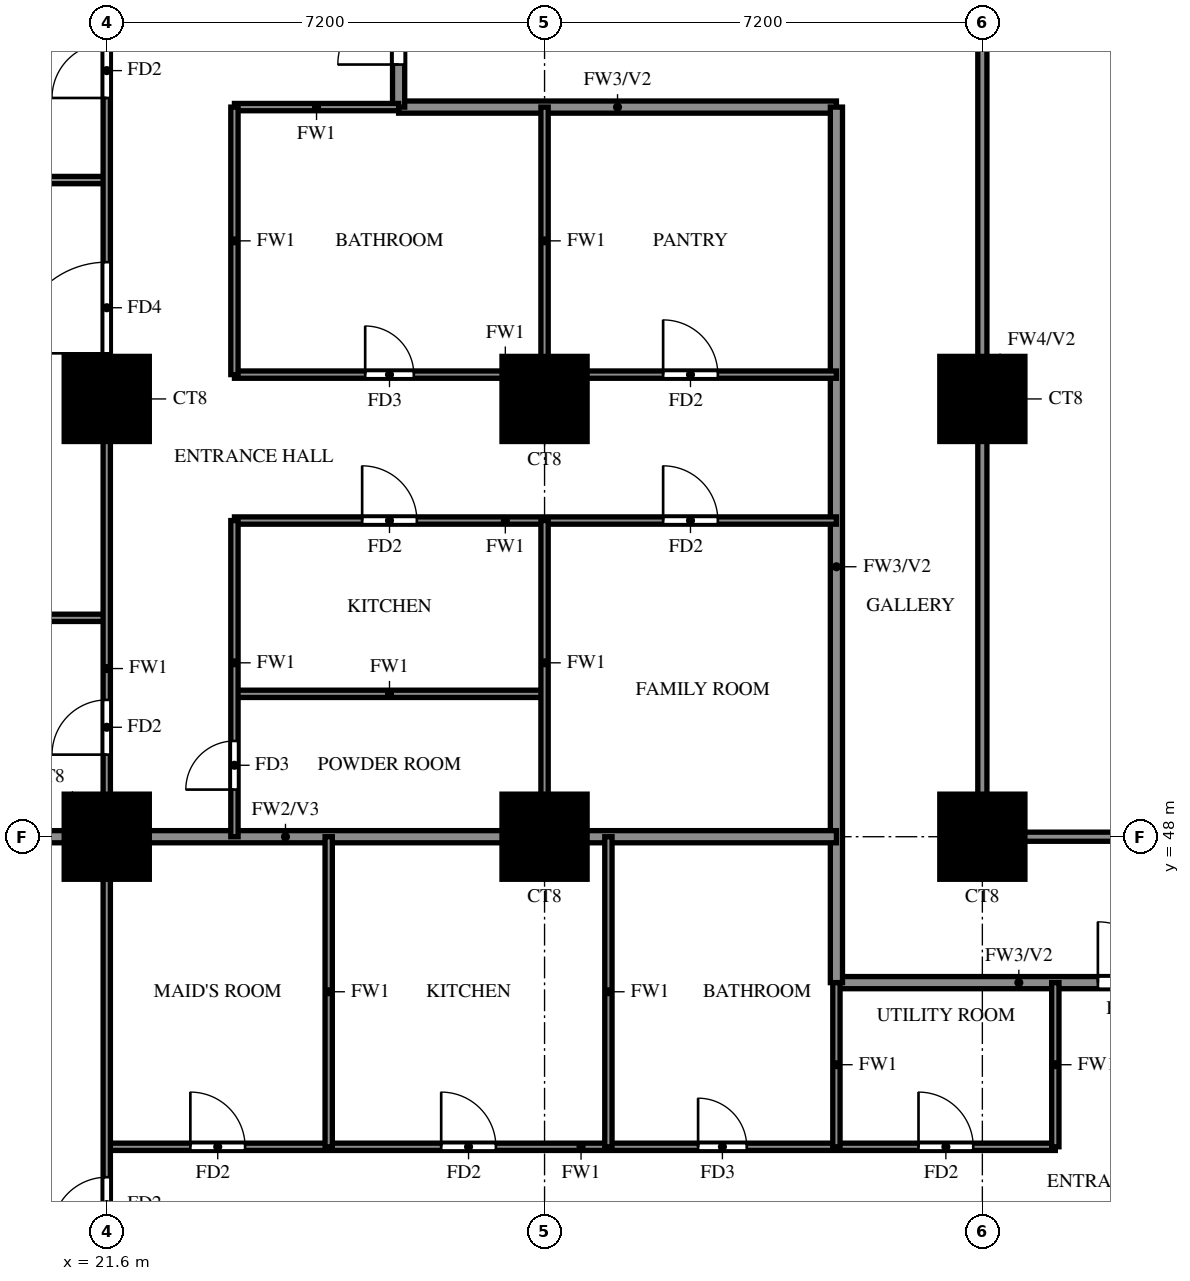
"""IFC4 building model, lengths in metres.
Left out: names, types, materials, properties, quantities, classifications, styles, units other than length and angle.
Written with IfcOpenShell. Run it as: python <this file> out.ifc"""

import sys

from ifc_helpers import new_model, si_unit, direction, frame, frame_2d, origin, origin_2d, place, context, subcontext, project, spatial, rectangle, extrude, source, transform, mapped, element, fill, save


model = new_model("IFC4")
c1 = context("Model", 3, precision=1e-05, world=origin(), true_north=direction((0.0, 1.0)))
c2 = subcontext(c1, "Body", "Model", "MODEL_VIEW")
j1 = project(units=[si_unit("LENGTHUNIT", "METRE"), si_unit("PLANEANGLEUNIT", "RADIAN")], contexts=[c1])
p1 = place(None, origin())
s1 = spatial("IfcSite", under=j1, at=p1, CompositionType="ELEMENT")
p2 = place(p1, origin())
s2 = spatial("IfcBuilding", under=s1, at=p2, CompositionType="ELEMENT")
p3 = place(p2, frame((0.0, 0.0, 37.5)))
s3 = spatial("IfcBuildingStorey", under=s2, at=p3, CompositionType="ELEMENT", Elevation=37.5)
m1 = source(origin(), c2, "Body", "SweptSolid", [
    extrude(rectangle(XDim=1.4, YDim=1.4, at=origin_2d()), origin(), (0.0, 0.0, 1.0), 3.18),
])
for number, where, z_axis, x_axis in (
    (1, (21.6, 48.0, 0.0), (0.0, 0.0, 1.0), (1.0, 0.0, 0.0)),
    (2, (28.8, 48.0, 0.0), (0.0, 0.0, 1.0), (1.0, 0.0, 0.0)),
    (3, (36.0, 48.0, 0.0), (0.0, 0.0, 1.0), (1.0, 0.0, 0.0)),
    (4, (21.6, 55.2, 0.0), (0.0, 0.0, 1.0), (1.0, 0.0, 0.0)),
    (5, (28.8, 55.2, 0.0), (0.0, 0.0, 1.0), (1.0, 0.0, 0.0)),
    (6, (36.0, 55.2, 0.0), (0.0, 0.0, 1.0), (1.0, 0.0, 0.0)),
):
    element("IfcColumn", number, at=place(p3, frame(where, z_axis=z_axis, x_axis=x_axis)), inside=s3, PredefinedType="COLUMN", context=c2, shape_type="MappedRepresentation", body=[
        mapped(m1, transform((0.0, 0.0, 0.0))),
    ])
p4 = place(p3, frame((33.6, 45.6, 0.0), z_axis=(0.0, 0.0, 1.0), x_axis=(1.0, 0.0, 0.0)))
e7 = element("IfcWall", 7, at=p4, inside=s3, PredefinedType="SOLIDWALL", context=c2, shape_type="SweptSolid", body=[
    extrude(rectangle(XDim=6.0, YDim=0.2, at=frame_2d((3.0, 0.0))), origin(), (0.0, 0.0, 1.0), 3.18),
])
p5 = place(p4, frame((4.3, 0.0, 0.0)))
e8 = element("IfcOpeningElement", 8, at=p5, cuts=e7, PredefinedType="OPENING", context=c2, shape_type="SweptSolid", body=[
    extrude(rectangle(XDim=1.0, YDim=2.1, at=frame_2d((0.5, 1.05))), frame((0.0, 0.11, 0.0), z_axis=(0.0, -1.0, 0.0), x_axis=(1.0, 0.0, 0.0)), (0.0, 0.0, 1.0), 0.22),
])
p6 = place(p3, frame((26.4, 60.0, 0.0), z_axis=(0.0, 0.0, 1.0), x_axis=(1.0, 0.0, 0.0)))
e9 = element("IfcWall", 9, at=p6, inside=s3, PredefinedType="SOLIDWALL", context=c2, shape_type="SweptSolid", body=[
    extrude(rectangle(XDim=7.2, YDim=0.2, at=frame_2d((3.6, 0.0))), origin(), (0.0, 0.0, 1.0), 3.18),
])
p7 = place(p3, frame((26.4, 60.0, 0.0), z_axis=(0.0, 0.0, 1.0), x_axis=(0.0, 1.0, 0.0)))
e10 = element("IfcWall", 10, at=p7, inside=s3, PredefinedType="SOLIDWALL", context=c2, shape_type="SweptSolid", body=[
    extrude(rectangle(XDim=9.6, YDim=0.2, at=frame_2d((4.8, 0.0))), origin(), (0.0, 0.0, 1.0), 3.18),
])
p8 = place(p7, frame((0.7, 0.0, 0.0)))
e11 = element("IfcOpeningElement", 11, at=p8, cuts=e10, PredefinedType="OPENING", context=c2, shape_type="SweptSolid", body=[
    extrude(rectangle(XDim=1.0, YDim=2.1, at=frame_2d((0.5, 1.05))), frame((0.0, 0.11, 0.0), z_axis=(0.0, -1.0, 0.0), x_axis=(1.0, 0.0, 0.0)), (0.0, 0.0, 1.0), 0.22),
])
p9 = place(p7, frame((3.1, 0.0, 0.0)))
e12 = element("IfcOpeningElement", 12, at=p9, cuts=e10, PredefinedType="OPENING", context=c2, shape_type="SweptSolid", body=[
    extrude(rectangle(XDim=1.0, YDim=2.1, at=frame_2d((0.5, 1.05))), frame((0.0, 0.11, 0.0), z_axis=(0.0, -1.0, 0.0), x_axis=(1.0, 0.0, 0.0)), (0.0, 0.0, 1.0), 0.22),
])
p10 = place(p3, frame((33.6, 45.6, 0.0), z_axis=(0.0, 0.0, 1.0), x_axis=(0.0, 1.0, 0.0)))
e13 = element("IfcWall", 13, at=p10, inside=s3, PredefinedType="SOLIDWALL", context=c2, shape_type="SweptSolid", body=[
    extrude(rectangle(XDim=14.4, YDim=0.2, at=frame_2d((7.2, 0.0))), origin(), (0.0, 0.0, 1.0), 3.18),
])
p11 = place(p3, frame((14.525, 48.0, 0.0), z_axis=(0.0, 0.0, 1.0), x_axis=(1.0, 0.0, 0.0)))
e14 = element("IfcWall", 14, at=p11, inside=s3, PredefinedType="SOLIDWALL", context=c2, shape_type="SweptSolid", body=[
    extrude(rectangle(XDim=19.075, YDim=0.2, at=frame_2d((9.538, 0.0))), origin(), (0.0, 0.0, 1.0), 3.18),
])
p12 = place(p3, frame((21.6, 42.9, 0.0), z_axis=(0.0, 0.0, 1.0), x_axis=(1.0, 0.0, 0.0)))
e15 = element("IfcWall", 15, at=p12, inside=s3, PredefinedType="PARTITIONING", context=c2, shape_type="SweptSolid", body=[
    extrude(rectangle(XDim=15.6, YDim=0.12, at=frame_2d((7.8, 0.0))), origin(), (0.0, 0.0, 1.0), 3.18),
])
p13 = place(p12, frame((1.375, 0.0, 0.0)))
e16 = element("IfcOpeningElement", 16, at=p13, cuts=e15, PredefinedType="OPENING", context=c2, shape_type="SweptSolid", body=[
    extrude(rectangle(XDim=0.9, YDim=2.1, at=frame_2d((0.45, 1.05))), frame((0.0, 0.07, 0.0), z_axis=(0.0, -1.0, 0.0), x_axis=(1.0, 0.0, 0.0)), (0.0, 0.0, 1.0), 0.14),
])
p14 = place(p12, frame((5.5, 0.0, 0.0)))
e17 = element("IfcOpeningElement", 17, at=p14, cuts=e15, PredefinedType="OPENING", context=c2, shape_type="SweptSolid", body=[
    extrude(rectangle(XDim=0.9, YDim=2.1, at=frame_2d((0.45, 1.05))), frame((0.0, 0.07, 0.0), z_axis=(0.0, -1.0, 0.0), x_axis=(1.0, 0.0, 0.0)), (0.0, 0.0, 1.0), 0.14),
])
p15 = place(p12, frame((9.725, 0.0, 0.0)))
e18 = element("IfcOpeningElement", 18, at=p15, cuts=e15, PredefinedType="OPENING", context=c2, shape_type="SweptSolid", body=[
    extrude(rectangle(XDim=0.8, YDim=2.1, at=frame_2d((0.4, 1.05))), frame((0.0, 0.07, 0.0), z_axis=(0.0, -1.0, 0.0), x_axis=(1.0, 0.0, 0.0)), (0.0, 0.0, 1.0), 0.14),
])
p16 = place(p12, frame((13.35, 0.0, 0.0)))
e19 = element("IfcOpeningElement", 19, at=p16, cuts=e15, PredefinedType="OPENING", context=c2, shape_type="SweptSolid", body=[
    extrude(rectangle(XDim=0.9, YDim=2.1, at=frame_2d((0.45, 1.05))), frame((0.0, 0.07, 0.0), z_axis=(0.0, -1.0, 0.0), x_axis=(1.0, 0.0, 0.0)), (0.0, 0.0, 1.0), 0.14),
])
p17 = place(p3, frame((23.7, 50.35, 0.0), z_axis=(0.0, 0.0, 1.0), x_axis=(1.0, 0.0, 0.0)))
e20 = element("IfcWall", 20, at=p17, inside=s3, PredefinedType="PARTITIONING", context=c2, shape_type="SweptSolid", body=[
    extrude(rectangle(XDim=5.1, YDim=0.12, at=frame_2d((2.55, 0.0))), origin(), (0.0, 0.0, 1.0), 3.18),
])
p18 = place(p3, frame((14.525, 51.6, 0.0), z_axis=(0.0, 0.0, 1.0), x_axis=(1.0, 0.0, 0.0)))
e21 = element("IfcWall", 21, at=p18, inside=s3, PredefinedType="PARTITIONING", context=c2, shape_type="SweptSolid", body=[
    extrude(rectangle(XDim=7.075, YDim=0.12, at=frame_2d((3.538, 0.0))), origin(), (0.0, 0.0, 1.0), 2.28),
])
p19 = place(p3, frame((23.7, 53.2, 0.0), z_axis=(0.0, 0.0, 1.0), x_axis=(1.0, 0.0, 0.0)))
e22 = element("IfcWall", 22, at=p19, inside=s3, PredefinedType="PARTITIONING", context=c2, shape_type="SweptSolid", body=[
    extrude(rectangle(XDim=9.9, YDim=0.12, at=frame_2d((4.95, 0.0))), origin(), (0.0, 0.0, 1.0), 3.18),
])
p20 = place(p19, frame((2.1, 0.0, 0.0)))
e23 = element("IfcOpeningElement", 23, at=p20, cuts=e22, PredefinedType="OPENING", context=c2, shape_type="SweptSolid", body=[
    extrude(rectangle(XDim=0.9, YDim=2.1, at=frame_2d((0.45, 1.05))), frame((0.0, 0.07, 0.0), z_axis=(0.0, -1.0, 0.0), x_axis=(1.0, 0.0, 0.0)), (0.0, 0.0, 1.0), 0.14),
])
p21 = place(p19, frame((7.05, 0.0, 0.0)))
e24 = element("IfcOpeningElement", 24, at=p21, cuts=e22, PredefinedType="OPENING", context=c2, shape_type="SweptSolid", body=[
    extrude(rectangle(XDim=0.9, YDim=2.1, at=frame_2d((0.45, 1.05))), frame((0.0, 0.07, 0.0), z_axis=(0.0, -1.0, 0.0), x_axis=(1.0, 0.0, 0.0)), (0.0, 0.0, 1.0), 0.14),
])
p22 = place(p3, frame((23.7, 55.6, 0.0), z_axis=(0.0, 0.0, 1.0), x_axis=(1.0, 0.0, 0.0)))
e25 = element("IfcWall", 25, at=p22, inside=s3, PredefinedType="PARTITIONING", context=c2, shape_type="SweptSolid", body=[
    extrude(rectangle(XDim=9.9, YDim=0.12, at=frame_2d((4.95, 0.0))), origin(), (0.0, 0.0, 1.0), 3.18),
])
p23 = place(p22, frame((2.15, 0.0, 0.0)))
e26 = element("IfcOpeningElement", 26, at=p23, cuts=e25, PredefinedType="OPENING", context=c2, shape_type="SweptSolid", body=[
    extrude(rectangle(XDim=0.8, YDim=2.1, at=frame_2d((0.4, 1.05))), frame((0.0, 0.07, 0.0), z_axis=(0.0, -1.0, 0.0), x_axis=(1.0, 0.0, 0.0)), (0.0, 0.0, 1.0), 0.14),
])
p24 = place(p22, frame((7.05, 0.0, 0.0)))
e27 = element("IfcOpeningElement", 27, at=p24, cuts=e25, PredefinedType="OPENING", context=c2, shape_type="SweptSolid", body=[
    extrude(rectangle(XDim=0.9, YDim=2.1, at=frame_2d((0.45, 1.05))), frame((0.0, 0.07, 0.0), z_axis=(0.0, -1.0, 0.0), x_axis=(1.0, 0.0, 0.0)), (0.0, 0.0, 1.0), 0.14),
])
p25 = place(p3, frame((14.525, 58.8, 0.0), z_axis=(0.0, 0.0, 1.0), x_axis=(1.0, 0.0, 0.0)))
e28 = element("IfcWall", 28, at=p25, inside=s3, PredefinedType="PARTITIONING", context=c2, shape_type="SweptSolid", body=[
    extrude(rectangle(XDim=7.075, YDim=0.12, at=frame_2d((3.538, 0.0))), origin(), (0.0, 0.0, 1.0), 2.28),
])
p26 = place(p3, frame((23.7, 60.0, 0.0), z_axis=(0.0, 0.0, 1.0), x_axis=(1.0, 0.0, 0.0)))
e29 = element("IfcWall", 29, at=p26, inside=s3, PredefinedType="PARTITIONING", context=c2, shape_type="SweptSolid", body=[
    extrude(rectangle(XDim=2.7, YDim=0.12, at=frame_2d((1.35, 0.0))), origin(), (0.0, 0.0, 1.0), 3.18),
])
p27 = place(p3, frame((21.6, 33.725, 0.0), z_axis=(0.0, 0.0, 1.0), x_axis=(0.0, 1.0, 0.0)))
e30 = element("IfcWall", 30, at=p27, inside=s3, PredefinedType="PARTITIONING", context=c2, shape_type="SweptSolid", body=[
    extrude(rectangle(XDim=35.875, YDim=0.12, at=frame_2d((17.938, 0.0))), origin(), (0.0, 0.0, 1.0), 3.18),
])
p28 = place(p27, frame((7.775, 0.0, 0.0)))
e31 = element("IfcOpeningElement", 31, at=p28, cuts=e30, PredefinedType="OPENING", context=c2, shape_type="SweptSolid", body=[
    extrude(rectangle(XDim=0.9, YDim=2.1, at=frame_2d((0.45, 1.05))), frame((0.0, 0.07, 0.0), z_axis=(0.0, -1.0, 0.0), x_axis=(1.0, 0.0, 0.0)), (0.0, 0.0, 1.0), 0.14),
])
p29 = place(p27, frame((15.625, 0.0, 0.0)))
e32 = element("IfcOpeningElement", 32, at=p29, cuts=e30, PredefinedType="OPENING", context=c2, shape_type="SweptSolid", body=[
    extrude(rectangle(XDim=0.9, YDim=2.1, at=frame_2d((0.45, 1.05))), frame((0.0, 0.07, 0.0), z_axis=(0.0, -1.0, 0.0), x_axis=(1.0, 0.0, 0.0)), (0.0, 0.0, 1.0), 0.14),
])
p30 = place(p27, frame((22.225, 0.0, 0.0)))
e33 = element("IfcOpeningElement", 33, at=p30, cuts=e30, PredefinedType="OPENING", context=c2, shape_type="SweptSolid", body=[
    extrude(rectangle(XDim=1.5, YDim=2.1, at=frame_2d((0.75, 1.05))), frame((0.0, 0.07, 0.0), z_axis=(0.0, -1.0, 0.0), x_axis=(1.0, 0.0, 0.0)), (0.0, 0.0, 1.0), 0.14),
])
p31 = place(p27, frame((26.425, 0.0, 0.0)))
e34 = element("IfcOpeningElement", 34, at=p31, cuts=e30, PredefinedType="OPENING", context=c2, shape_type="SweptSolid", body=[
    extrude(rectangle(XDim=0.9, YDim=2.1, at=frame_2d((0.45, 1.05))), frame((0.0, 0.07, 0.0), z_axis=(0.0, -1.0, 0.0), x_axis=(1.0, 0.0, 0.0)), (0.0, 0.0, 1.0), 0.14),
])
p32 = place(p27, frame((30.025, 0.0, 0.0)))
e35 = element("IfcOpeningElement", 35, at=p32, cuts=e30, PredefinedType="OPENING", context=c2, shape_type="SweptSolid", body=[
    extrude(rectangle(XDim=0.9, YDim=2.1, at=frame_2d((0.45, 1.05))), frame((0.0, 0.07, 0.0), z_axis=(0.0, -1.0, 0.0), x_axis=(1.0, 0.0, 0.0)), (0.0, 0.0, 1.0), 0.14),
])
p33 = place(p27, frame((33.625, 0.0, 0.0)))
e36 = element("IfcOpeningElement", 36, at=p33, cuts=e30, PredefinedType="OPENING", context=c2, shape_type="SweptSolid", body=[
    extrude(rectangle(XDim=0.9, YDim=2.1, at=frame_2d((0.45, 1.05))), frame((0.0, 0.07, 0.0), z_axis=(0.0, -1.0, 0.0), x_axis=(1.0, 0.0, 0.0)), (0.0, 0.0, 1.0), 0.14),
])
p34 = place(p3, frame((23.7, 48.0, 0.0), z_axis=(0.0, 0.0, 1.0), x_axis=(0.0, 1.0, 0.0)))
e37 = element("IfcWall", 37, at=p34, inside=s3, PredefinedType="PARTITIONING", context=c2, shape_type="SweptSolid", body=[
    extrude(rectangle(XDim=5.2, YDim=0.12, at=frame_2d((2.6, 0.0))), origin(), (0.0, 0.0, 1.0), 3.18),
])
p35 = place(p34, frame((0.775, 0.0, 0.0)))
e38 = element("IfcOpeningElement", 38, at=p35, cuts=e37, PredefinedType="OPENING", context=c2, shape_type="SweptSolid", body=[
    extrude(rectangle(XDim=0.8, YDim=2.1, at=frame_2d((0.4, 1.05))), frame((0.0, 0.07, 0.0), z_axis=(0.0, -1.0, 0.0), x_axis=(1.0, 0.0, 0.0)), (0.0, 0.0, 1.0), 0.14),
])
p36 = place(p3, frame((23.7, 55.6, 0.0), z_axis=(0.0, 0.0, 1.0), x_axis=(0.0, 1.0, 0.0)))
e39 = element("IfcWall", 39, at=p36, inside=s3, PredefinedType="PARTITIONING", context=c2, shape_type="SweptSolid", body=[
    extrude(rectangle(XDim=4.4, YDim=0.12, at=frame_2d((2.2, 0.0))), origin(), (0.0, 0.0, 1.0), 3.18),
])
p37 = place(p3, frame((25.25, 42.9, 0.0), z_axis=(0.0, 0.0, 1.0), x_axis=(0.0, 1.0, 0.0)))
e40 = element("IfcWall", 40, at=p37, inside=s3, PredefinedType="PARTITIONING", context=c2, shape_type="SweptSolid", body=[
    extrude(rectangle(XDim=5.1, YDim=0.12, at=frame_2d((2.55, 0.0))), origin(), (0.0, 0.0, 1.0), 3.18),
])
p38 = place(p3, frame((28.8, 48.0, 0.0), z_axis=(0.0, 0.0, 1.0), x_axis=(0.0, 1.0, 0.0)))
e41 = element("IfcWall", 41, at=p38, inside=s3, PredefinedType="PARTITIONING", context=c2, shape_type="SweptSolid", body=[
    extrude(rectangle(XDim=5.2, YDim=0.12, at=frame_2d((2.6, 0.0))), origin(), (0.0, 0.0, 1.0), 3.18),
])
p39 = place(p3, frame((28.8, 55.6, 0.0), z_axis=(0.0, 0.0, 1.0), x_axis=(0.0, 1.0, 0.0)))
e42 = element("IfcWall", 42, at=p39, inside=s3, PredefinedType="PARTITIONING", context=c2, shape_type="SweptSolid", body=[
    extrude(rectangle(XDim=4.4, YDim=0.12, at=frame_2d((2.2, 0.0))), origin(), (0.0, 0.0, 1.0), 3.18),
])
p40 = place(p3, frame((29.85, 42.9, 0.0), z_axis=(0.0, 0.0, 1.0), x_axis=(0.0, 1.0, 0.0)))
e43 = element("IfcWall", 43, at=p40, inside=s3, PredefinedType="PARTITIONING", context=c2, shape_type="SweptSolid", body=[
    extrude(rectangle(XDim=5.1, YDim=0.12, at=frame_2d((2.55, 0.0))), origin(), (0.0, 0.0, 1.0), 3.18),
])
for number, where, z_axis, x_axis in (
    (44, (33.6, 42.9, 0.0), (0.0, 0.0, 1.0), (0.0, 1.0, 0.0)),
    (45, (37.2, 42.9, 0.0), (0.0, 0.0, 1.0), (0.0, 1.0, 0.0)),
):
    element("IfcWall", number, at=place(p3, frame(where, z_axis=z_axis, x_axis=x_axis)), inside=s3, PredefinedType="PARTITIONING", context=c2, shape_type="SweptSolid", body=[
        extrude(rectangle(XDim=2.7, YDim=0.12, at=frame_2d((1.35, 0.0))), origin(), (0.0, 0.0, 1.0), 3.18),
    ])
p41 = place(p3, frame((36.0, 48.0, 0.0), z_axis=(0.0, 0.0, 1.0), x_axis=(1.0, 0.0, 0.0)))
e46 = element("IfcWall", 46, at=p41, inside=s3, PredefinedType="SOLIDWALL", context=c2, shape_type="SweptSolid", body=[
    extrude(rectangle(XDim=7.2, YDim=0.15, at=frame_2d((3.6, 0.0))), origin(), (0.0, 0.0, 1.0), 2.28),
])
p42 = place(p3, frame((36.0, 48.0, 0.0), z_axis=(0.0, 0.0, 1.0), x_axis=(0.0, 1.0, 0.0)))
e47 = element("IfcWall", 47, at=p42, inside=s3, PredefinedType="SOLIDWALL", context=c2, shape_type="SweptSolid", body=[
    extrude(rectangle(XDim=14.4, YDim=0.15, at=frame_2d((7.2, 0.0))), origin(), (0.0, 0.0, 1.0), 2.28),
])
p43 = place(p5, origin())
e48 = element("IfcDoor", 48, at=p43, inside=s3, OperationType="SINGLE_SWING_LEFT", PredefinedType="DOOR", context=c2, shape_type="SweptSolid", body=[
    extrude(rectangle(XDim=1.0, YDim=2.1, at=frame_2d((0.5, 1.05))), frame((0.0, 0.025, 0.0), z_axis=(0.0, -1.0, 0.0), x_axis=(1.0, 0.0, 0.0)), (0.0, 0.0, 1.0), 0.05),
])
fill(e8, e48)
p44 = place(p28, origin())
e49 = element("IfcDoor", 49, at=p44, inside=s3, OperationType="SINGLE_SWING_LEFT", PredefinedType="DOOR", context=c2, shape_type="SweptSolid", body=[
    extrude(rectangle(XDim=0.9, YDim=2.1, at=frame_2d((0.45, 1.05))), frame((0.0, 0.025, 0.0), z_axis=(0.0, -1.0, 0.0), x_axis=(1.0, 0.0, 0.0)), (0.0, 0.0, 1.0), 0.05),
])
fill(e31, e49)
p45 = place(p13, origin())
e50 = element("IfcDoor", 50, at=p45, inside=s3, OperationType="SINGLE_SWING_RIGHT", PredefinedType="DOOR", context=c2, shape_type="SweptSolid", body=[
    extrude(rectangle(XDim=0.9, YDim=2.1, at=frame_2d((0.45, 1.05))), frame((0.0, 0.025, 0.0), z_axis=(0.0, -1.0, 0.0), x_axis=(1.0, 0.0, 0.0)), (0.0, 0.0, 1.0), 0.05),
])
fill(e16, e50)
p46 = place(p14, origin())
e51 = element("IfcDoor", 51, at=p46, inside=s3, OperationType="SINGLE_SWING_LEFT", PredefinedType="DOOR", context=c2, shape_type="SweptSolid", body=[
    extrude(rectangle(XDim=0.9, YDim=2.1, at=frame_2d((0.45, 1.05))), frame((0.0, 0.025, 0.0), z_axis=(0.0, -1.0, 0.0), x_axis=(1.0, 0.0, 0.0)), (0.0, 0.0, 1.0), 0.05),
])
fill(e17, e51)
p47 = place(p15, origin())
e52 = element("IfcDoor", 52, at=p47, inside=s3, OperationType="SINGLE_SWING_LEFT", PredefinedType="DOOR", context=c2, shape_type="SweptSolid", body=[
    extrude(rectangle(XDim=0.8, YDim=2.1, at=frame_2d((0.4, 1.05))), frame((0.0, 0.025, 0.0), z_axis=(0.0, -1.0, 0.0), x_axis=(1.0, 0.0, 0.0)), (0.0, 0.0, 1.0), 0.05),
])
fill(e18, e52)
p48 = place(p16, origin())
e53 = element("IfcDoor", 53, at=p48, inside=s3, OperationType="SINGLE_SWING_RIGHT", PredefinedType="DOOR", context=c2, shape_type="SweptSolid", body=[
    extrude(rectangle(XDim=0.9, YDim=2.1, at=frame_2d((0.45, 1.05))), frame((0.0, 0.025, 0.0), z_axis=(0.0, -1.0, 0.0), x_axis=(1.0, 0.0, 0.0)), (0.0, 0.0, 1.0), 0.05),
])
fill(e19, e53)
p49 = place(p8, origin())
e54 = element("IfcDoor", 54, at=p49, inside=s3, OperationType="SINGLE_SWING_LEFT", PredefinedType="DOOR", context=c2, shape_type="SweptSolid", body=[
    extrude(rectangle(XDim=1.0, YDim=2.1, at=frame_2d((0.5, 1.05))), frame((0.0, 0.025, 0.0), z_axis=(0.0, -1.0, 0.0), x_axis=(1.0, 0.0, 0.0)), (0.0, 0.0, 1.0), 0.05),
])
fill(e11, e54)
p50 = place(p29, origin())
e55 = element("IfcDoor", 55, at=p50, inside=s3, OperationType="SINGLE_SWING_LEFT", PredefinedType="DOOR", context=c2, shape_type="SweptSolid", body=[
    extrude(rectangle(XDim=0.9, YDim=2.1, at=frame_2d((0.45, 1.05))), frame((0.0, 0.025, 0.0), z_axis=(0.0, -1.0, 0.0), x_axis=(1.0, 0.0, 0.0)), (0.0, 0.0, 1.0), 0.05),
])
fill(e32, e55)
p51 = place(p30, origin())
e56 = element("IfcDoor", 56, at=p51, inside=s3, OperationType="SINGLE_SWING_LEFT", PredefinedType="DOOR", context=c2, shape_type="SweptSolid", body=[
    extrude(rectangle(XDim=1.5, YDim=2.1, at=frame_2d((0.75, 1.05))), frame((0.0, 0.025, 0.0), z_axis=(0.0, -1.0, 0.0), x_axis=(1.0, 0.0, 0.0)), (0.0, 0.0, 1.0), 0.05),
])
fill(e33, e56)
p52 = place(p31, origin())
e57 = element("IfcDoor", 57, at=p52, inside=s3, OperationType="SINGLE_SWING_LEFT", PredefinedType="DOOR", context=c2, shape_type="SweptSolid", body=[
    extrude(rectangle(XDim=0.9, YDim=2.1, at=frame_2d((0.45, 1.05))), frame((0.0, 0.025, 0.0), z_axis=(0.0, -1.0, 0.0), x_axis=(1.0, 0.0, 0.0)), (0.0, 0.0, 1.0), 0.05),
])
fill(e34, e57)
p53 = place(p35, origin())
e58 = element("IfcDoor", 58, at=p53, inside=s3, OperationType="SINGLE_SWING_LEFT", PredefinedType="DOOR", context=c2, shape_type="SweptSolid", body=[
    extrude(rectangle(XDim=0.8, YDim=2.1, at=frame_2d((0.4, 1.05))), frame((0.0, 0.025, 0.0), z_axis=(0.0, -1.0, 0.0), x_axis=(1.0, 0.0, 0.0)), (0.0, 0.0, 1.0), 0.05),
])
fill(e38, e58)
p54 = place(p20, origin())
e59 = element("IfcDoor", 59, at=p54, inside=s3, OperationType="SINGLE_SWING_RIGHT", PredefinedType="DOOR", context=c2, shape_type="SweptSolid", body=[
    extrude(rectangle(XDim=0.9, YDim=2.1, at=frame_2d((0.45, 1.05))), frame((0.0, 0.025, 0.0), z_axis=(0.0, -1.0, 0.0), x_axis=(1.0, 0.0, 0.0)), (0.0, 0.0, 1.0), 0.05),
])
fill(e23, e59)
p55 = place(p23, origin())
e60 = element("IfcDoor", 60, at=p55, inside=s3, OperationType="SINGLE_SWING_LEFT", PredefinedType="DOOR", context=c2, shape_type="SweptSolid", body=[
    extrude(rectangle(XDim=0.8, YDim=2.1, at=frame_2d((0.4, 1.05))), frame((0.0, 0.025, 0.0), z_axis=(0.0, -1.0, 0.0), x_axis=(1.0, 0.0, 0.0)), (0.0, 0.0, 1.0), 0.05),
])
fill(e26, e60)
p56 = place(p21, origin())
e61 = element("IfcDoor", 61, at=p56, inside=s3, OperationType="SINGLE_SWING_LEFT", PredefinedType="DOOR", context=c2, shape_type="SweptSolid", body=[
    extrude(rectangle(XDim=0.9, YDim=2.1, at=frame_2d((0.45, 1.05))), frame((0.0, 0.025, 0.0), z_axis=(0.0, -1.0, 0.0), x_axis=(1.0, 0.0, 0.0)), (0.0, 0.0, 1.0), 0.05),
])
fill(e24, e61)
p57 = place(p24, origin())
e62 = element("IfcDoor", 62, at=p57, inside=s3, OperationType="SINGLE_SWING_RIGHT", PredefinedType="DOOR", context=c2, shape_type="SweptSolid", body=[
    extrude(rectangle(XDim=0.9, YDim=2.1, at=frame_2d((0.45, 1.05))), frame((0.0, 0.025, 0.0), z_axis=(0.0, -1.0, 0.0), x_axis=(1.0, 0.0, 0.0)), (0.0, 0.0, 1.0), 0.05),
])
fill(e27, e62)
save(model, sys.argv[1])
